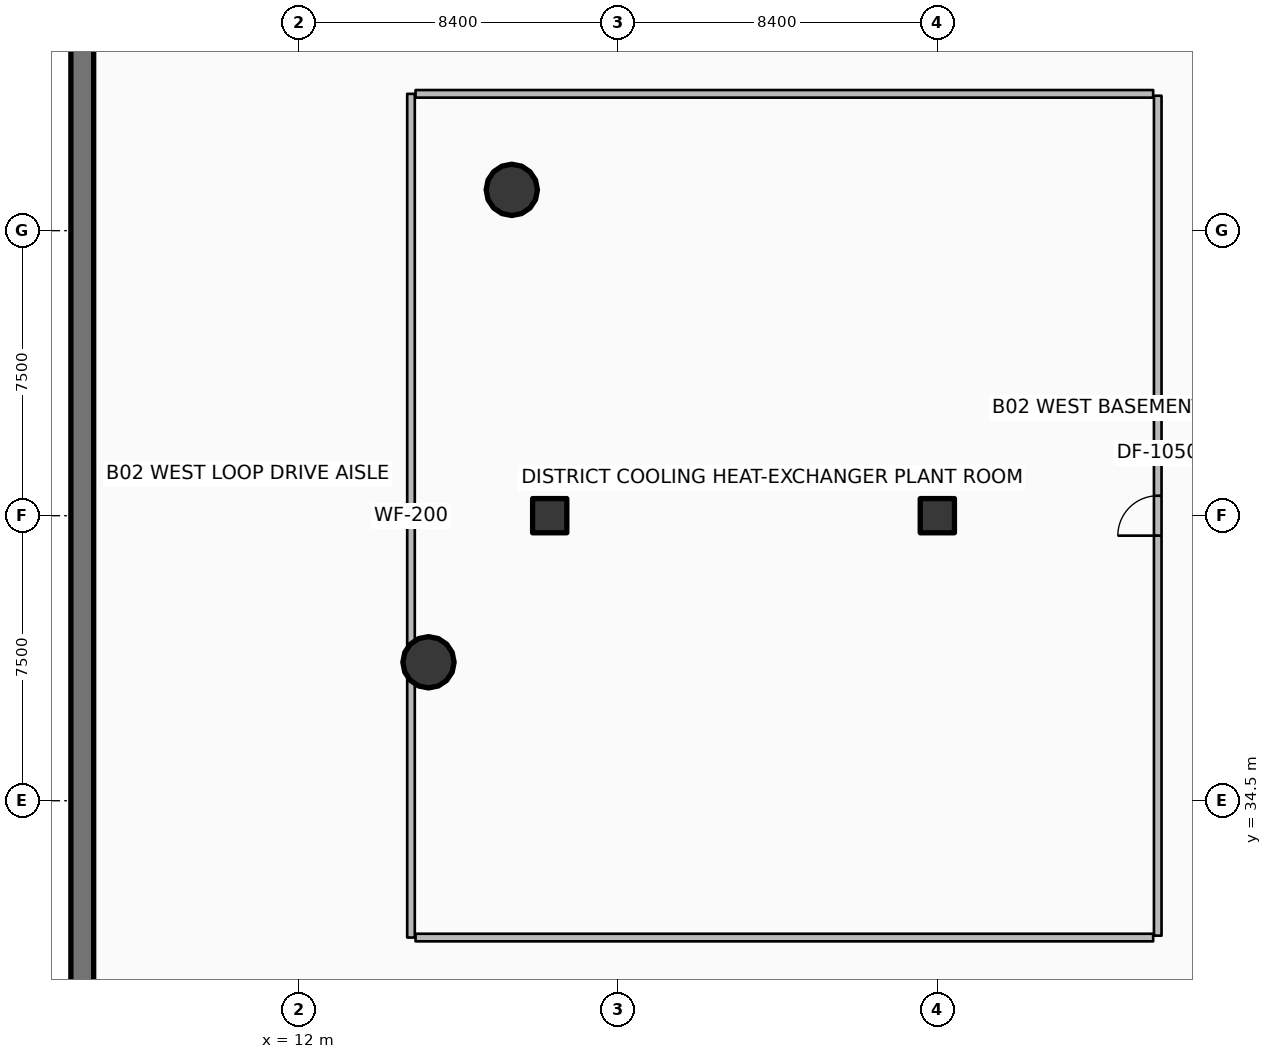
"""IFC4 building model, lengths in metres.
Left out: names, types, materials, properties, quantities, classifications, styles, units other than length and angle.
Written with IfcOpenShell. Run it as: python <this file> out.ifc"""

import sys

from ifc_helpers import new_model, si_unit, direction, frame, frame_2d, origin, origin_2d, place, context, subcontext, project, spatial, rectangle, circle, extrude, element, fill, save


model = new_model("IFC4")
c1 = context("Model", 3, precision=1e-05, world=origin(), true_north=direction((0.0, 1.0)))
c2 = subcontext(c1, "Body", "Model", "MODEL_VIEW")
j1 = project(units=[si_unit("LENGTHUNIT", "METRE"), si_unit("PLANEANGLEUNIT", "RADIAN")], contexts=[c1])
p1 = place(None, origin())
s1 = spatial("IfcSite", under=j1, at=p1, CompositionType="ELEMENT")
p2 = place(p1, origin())
s2 = spatial("IfcBuilding", under=s1, at=p2, CompositionType="ELEMENT")
p3 = place(p2, frame((0.0, 0.0, -7.6)))
s3 = spatial("IfcBuildingStorey", under=s2, at=p3, CompositionType="ELEMENT", Elevation=-7.6)
p4 = place(p3, frame((6.3, 6.6, 0.0), z_axis=(0.0, 0.0, 1.0), x_axis=(0.0, 1.0, 0.0)))
e1 = element("IfcWall", 1, at=p4, inside=s3, PredefinedType="USERDEFINED", context=c2, shape_type="SweptSolid", body=[
    extrude(rectangle(XDim=70.8, YDim=0.6, at=frame_2d((35.4, 0.0))), origin(), (0.0, 0.0, 1.0), 3.8),
])
for number, where, z_axis, x_axis in (
    (2, (18.6, 42.0, 0.0), (0.0, 0.0, 1.0), (1.0, 0.0, 0.0)),
    (3, (28.8, 42.0, 0.0), (0.0, 0.0, 1.0), (1.0, 0.0, 0.0)),
):
    element("IfcColumn", number, at=place(p3, frame(where, z_axis=z_axis, x_axis=x_axis)), inside=s3, PredefinedType="COLUMN", context=c2, shape_type="SweptSolid", body=[
        extrude(rectangle(XDim=0.9, YDim=0.9, at=origin_2d()), origin(), (0.0, 0.0, 1.0), 3.52),
    ])
for number, where, z_axis, x_axis in (
    (4, (17.602, 50.573, 0.0), (0.0, 0.0, 1.0), (1.0, 0.0, 0.0)),
    (5, (15.41, 38.143, 0.0), (0.0, 0.0, 1.0), (1.0, 0.0, 0.0)),
):
    element("IfcColumn", number, at=place(p3, frame(where, z_axis=z_axis, x_axis=x_axis)), inside=s3, PredefinedType="COLUMN", context=c2, shape_type="SweptSolid", body=[
        extrude(circle(Radius=0.675, at=origin_2d()), origin(), (0.0, 0.0, 1.0), 3.52),
    ])
p5 = place(p3, frame((14.95, 30.9, 0.0), z_axis=(0.0, 0.0, 1.0), x_axis=(0.0, 1.0, 0.0)))
e6 = element("IfcWall", 6, at=p5, inside=s3, PredefinedType="PARTITIONING", context=c2, shape_type="SweptSolid", body=[
    extrude(rectangle(XDim=22.2, YDim=0.2, at=frame_2d((11.1, 0.0))), origin(), (0.0, 0.0, 1.0), 2.96),
])
for number, where, z_axis, x_axis in (
    (7, (15.07, 53.1, 0.0), (0.0, 0.0, 1.0), (1.0, 0.0, 0.0)),
    (8, (15.07, 30.9, 0.0), (0.0, 0.0, 1.0), (1.0, 0.0, 0.0)),
):
    element("IfcWall", number, at=place(p3, frame(where, z_axis=z_axis, x_axis=x_axis)), inside=s3, PredefinedType="PARTITIONING", context=c2, shape_type="SweptSolid", body=[
        extrude(rectangle(XDim=19.41, YDim=0.2, at=frame_2d((9.705, 0.0))), origin(), (0.0, 0.0, 1.0), 2.811),
    ])
p6 = place(p3, frame((34.6, 30.95, 0.0), z_axis=(0.0, 0.0, 1.0), x_axis=(0.0, 1.0, 0.0)))
e9 = element("IfcWall", 9, at=p6, inside=s3, PredefinedType="PARTITIONING", context=c2, shape_type="SweptSolid", body=[
    extrude(rectangle(XDim=22.1, YDim=0.2, at=frame_2d((11.05, 0.0))), origin(), (0.0, 0.0, 1.0), 2.811),
])
p7 = place(p6, frame((10.525, 0.0, 0.0)))
e10 = element("IfcOpeningElement", 10, at=p7, cuts=e9, PredefinedType="OPENING", context=c2, shape_type="SweptSolid", body=[
    extrude(rectangle(XDim=1.05, YDim=2.1, at=frame_2d((0.525, 1.05))), frame((0.0, 0.11, 0.0), z_axis=(0.0, -1.0, 0.0), x_axis=(1.0, 0.0, 0.0)), (0.0, 0.0, 1.0), 0.22),
])
p8 = place(p7, origin())
e11 = element("IfcDoor", 11, at=p8, inside=s3, OperationType="SINGLE_SWING_LEFT", PredefinedType="DOOR", context=c2, shape_type="SweptSolid", body=[
    extrude(rectangle(XDim=1.05, YDim=2.1, at=frame_2d((0.525, 1.05))), frame((0.0, 0.025, 0.0), z_axis=(0.0, -1.0, 0.0), x_axis=(1.0, 0.0, 0.0)), (0.0, 0.0, 1.0), 0.05),
])
fill(e10, e11)
save(model, sys.argv[1])
